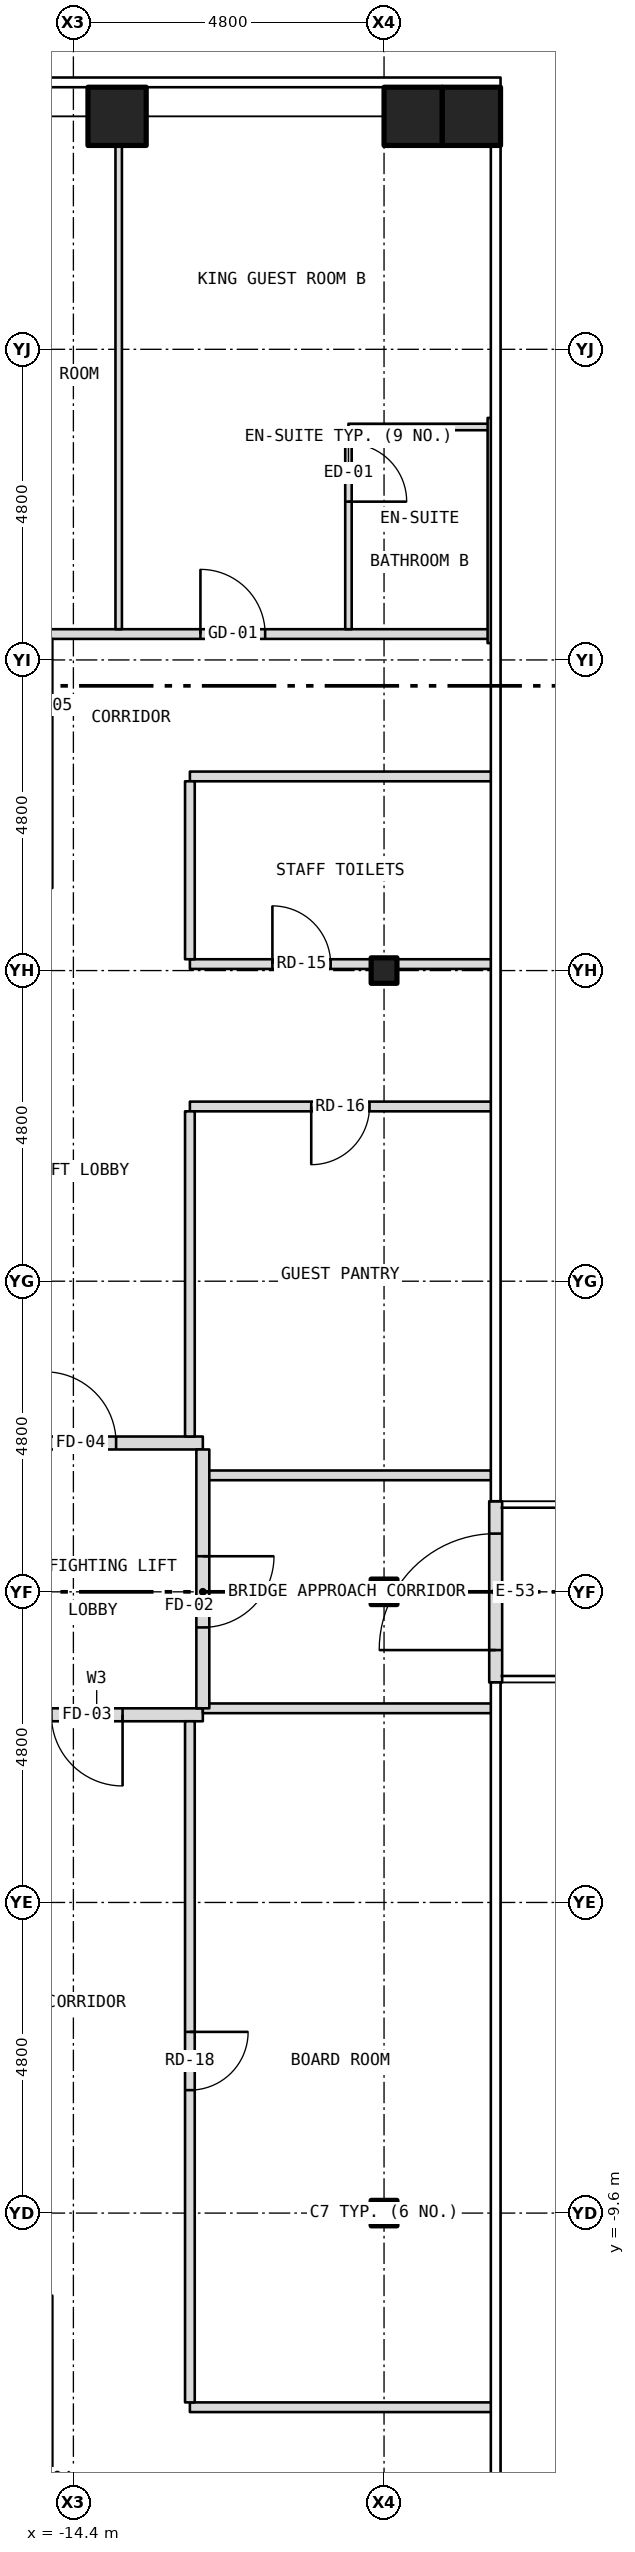
"""IFC4 building model, lengths in metres.
Left out: names, types, materials, properties, quantities, classifications, styles, units other than length and angle.
Written with IfcOpenShell. Run it as: python <this file> out.ifc"""

import sys

from ifc_helpers import new_model, si_unit, direction, frame, frame_2d, origin, origin_2d, place, context, subcontext, project, spatial, rectangle, hollow_rectangle, i_section, extrude, element, fill, save


model = new_model("IFC4")
c1 = context("Model", 3, precision=1e-05, world=origin(), true_north=direction((0.0, 1.0)))
c2 = subcontext(c1, "Body", "Model", "MODEL_VIEW")
j1 = project(units=[si_unit("LENGTHUNIT", "METRE"), si_unit("PLANEANGLEUNIT", "RADIAN")], contexts=[c1])
p1 = place(None, origin())
s1 = spatial("IfcSite", under=j1, at=p1, CompositionType="ELEMENT")
p2 = place(p1, origin())
s2 = spatial("IfcBuilding", under=s1, at=p2, CompositionType="ELEMENT")
p3 = place(p2, frame((0.0, 0.0, 131.0)))
s3 = spatial("IfcBuildingStorey", under=s2, at=p3, CompositionType="ELEMENT", Elevation=131.0)
for number, where, z_axis, x_axis in (
    (1, (-13.725, 22.8, -0.15), (0.0, 0.0, 1.0), (1.0, 0.0, 0.0)),
    (2, (-9.15, 22.8, -0.15), (0.0, 0.0, 1.0), (1.0, 0.0, 0.0)),
    (3, (-8.25, 22.8, -0.15), (0.0, 0.0, 1.0), (1.0, 0.0, 0.0)),
):
    element("IfcColumn", number, at=place(p3, frame(where, z_axis=z_axis, x_axis=x_axis)), inside=s3, PredefinedType="COLUMN", context=c2, shape_type="SweptSolid", body=[
        extrude(hollow_rectangle(XDim=0.9, YDim=0.9, WallThickness=0.05, at=origin_2d()), origin(), (0.0, 0.0, 1.0), 3.5),
    ])
for number, where, z_axis, x_axis in (
    (4, (-9.6, -9.6, -0.15), (0.0, 0.0, 1.0), (1.0, 0.0, 0.0)),
    (5, (-9.6, 0.0, -0.15), (0.0, 0.0, 1.0), (1.0, 0.0, 0.0)),
    (6, (-9.6, 9.6, -0.15), (0.0, 0.0, 1.0), (1.0, 0.0, 0.0)),
):
    element("IfcColumn", number, at=place(p3, frame(where, z_axis=z_axis, x_axis=x_axis)), inside=s3, PredefinedType="COLUMN", context=c2, shape_type="SweptSolid", body=[
        extrude(i_section(OverallWidth=0.399, OverallDepth=0.394, WebThickness=0.023, FlangeThickness=0.037, at=origin_2d()), origin(), (0.0, 0.0, 1.0), 3.5),
    ])
p4 = place(p3, frame((-7.875, -1.4, 0.0), z_axis=(0.0, 0.0, 1.0), x_axis=(0.0, 1.0, 0.0)))
e7 = element("IfcWall", 7, at=p4, inside=s3, PredefinedType="SOLIDWALL", context=c2, shape_type="SweptSolid", body=[
    extrude(rectangle(XDim=2.8, YDim=0.2, at=frame_2d((1.4, 0.0))), origin(), (0.0, 0.0, 1.0), 3.5),
])
p5 = place(p4, frame((0.5, 0.0, 0.0)))
e8 = element("IfcOpeningElement", 8, at=p5, cuts=e7, PredefinedType="OPENING", context=c2, shape_type="SweptSolid", body=[
    extrude(rectangle(XDim=1.8, YDim=2.1, at=frame_2d((0.9, 1.05))), frame((0.0, 0.112, 0.0), z_axis=(0.0, -1.0, 0.0), x_axis=(1.0, 0.0, 0.0)), (0.0, 0.0, 1.0), 0.224),
])
p6 = place(p3, frame((-12.6, -12.6, 0.0), z_axis=(0.0, 0.0, 1.0), x_axis=(1.0, 0.0, 0.0)))
e9 = element("IfcWall", 9, at=p6, inside=s3, PredefinedType="PARTITIONING", context=c2, shape_type="SweptSolid", body=[
    extrude(rectangle(XDim=4.68, YDim=0.15, at=frame_2d((2.34, 0.0))), origin(), (0.0, 0.0, 1.0), 3.35),
])
p7 = place(p3, frame((-15.68, -1.9, 0.0), z_axis=(0.0, 0.0, 1.0), x_axis=(1.0, 0.0, 0.0)))
e10 = element("IfcWall", 10, at=p7, inside=s3, PredefinedType="PARTITIONING", context=c2, shape_type="SweptSolid", body=[
    extrude(rectangle(XDim=3.28, YDim=0.2, at=frame_2d((1.64, 0.0))), origin(), (0.0, 0.0, 1.0), 3.35),
])
p8 = place(p7, frame((0.94, 0.0, 0.0)))
e11 = element("IfcOpeningElement", 11, at=p8, cuts=e10, PredefinedType="OPENING", context=c2, shape_type="SweptSolid", body=[
    extrude(rectangle(XDim=1.1, YDim=2.1, at=frame_2d((0.55, 1.05))), frame((0.0, 0.112, 0.0), z_axis=(0.0, -1.0, 0.0), x_axis=(1.0, 0.0, 0.0)), (0.0, 0.0, 1.0), 0.224),
])
for number, where, z_axis, x_axis in (
    (12, (-12.4, -1.8, 0.0), (0.0, 0.0, 1.0), (1.0, 0.0, 0.0)),
    (13, (-12.4, 1.8, 0.0), (0.0, 0.0, 1.0), (1.0, 0.0, 0.0)),
):
    element("IfcWall", number, at=place(p3, frame(where, z_axis=z_axis, x_axis=x_axis)), inside=s3, PredefinedType="PARTITIONING", context=c2, shape_type="SweptSolid", body=[
        extrude(rectangle(XDim=4.48, YDim=0.15, at=frame_2d((2.24, 0.0))), origin(), (0.0, 0.0, 1.0), 3.35),
    ])
p9 = place(p3, frame((-15.68, 2.3, 0.0), z_axis=(0.0, 0.0, 1.0), x_axis=(1.0, 0.0, 0.0)))
e14 = element("IfcWall", 14, at=p9, inside=s3, PredefinedType="PARTITIONING", context=c2, shape_type="SweptSolid", body=[
    extrude(rectangle(XDim=3.28, YDim=0.2, at=frame_2d((1.64, 0.0))), origin(), (0.0, 0.0, 1.0), 3.35),
])
p10 = place(p9, frame((0.84, 0.0, 0.0)))
e15 = element("IfcOpeningElement", 15, at=p10, cuts=e14, PredefinedType="OPENING", context=c2, shape_type="SweptSolid", body=[
    extrude(rectangle(XDim=1.1, YDim=2.1, at=frame_2d((0.55, 1.05))), frame((0.0, 0.112, 0.0), z_axis=(0.0, -1.0, 0.0), x_axis=(1.0, 0.0, 0.0)), (0.0, 0.0, 1.0), 0.224),
])
p11 = place(p3, frame((-12.6, 7.5, 0.0), z_axis=(0.0, 0.0, 1.0), x_axis=(1.0, 0.0, 0.0)))
e16 = element("IfcWall", 16, at=p11, inside=s3, PredefinedType="PARTITIONING", context=c2, shape_type="SweptSolid", body=[
    extrude(rectangle(XDim=4.68, YDim=0.15, at=frame_2d((2.34, 0.0))), origin(), (0.0, 0.0, 1.0), 3.35),
])
p12 = place(p11, frame((1.875, 0.0, 0.0)))
e17 = element("IfcOpeningElement", 17, at=p12, cuts=e16, PredefinedType="OPENING", context=c2, shape_type="SweptSolid", body=[
    extrude(rectangle(XDim=0.9, YDim=2.1, at=frame_2d((0.45, 1.05))), frame((0.0, 0.087, 0.0), z_axis=(0.0, -1.0, 0.0), x_axis=(1.0, 0.0, 0.0)), (0.0, 0.0, 1.0), 0.174),
])
p13 = place(p3, frame((-12.6, 9.7, 0.0), z_axis=(0.0, 0.0, 1.0), x_axis=(1.0, 0.0, 0.0)))
e18 = element("IfcWall", 18, at=p13, inside=s3, PredefinedType="PARTITIONING", context=c2, shape_type="SweptSolid", body=[
    extrude(rectangle(XDim=2.801, YDim=0.15, at=frame_2d((1.4, 0.0))), origin(), (0.0, 0.0, 1.0), 2.728),
])
p14 = place(p13, frame((1.275, 0.0, 0.0)))
e19 = element("IfcOpeningElement", 19, at=p14, cuts=e18, PredefinedType="OPENING", context=c2, shape_type="SweptSolid", body=[
    extrude(rectangle(XDim=0.9, YDim=2.1, at=frame_2d((0.45, 1.05))), frame((0.0, 0.087, 0.0), z_axis=(0.0, -1.0, 0.0), x_axis=(1.0, 0.0, 0.0)), (0.0, 0.0, 1.0), 0.174),
])
p15 = place(p3, frame((-9.799, 9.7, 0.0), z_axis=(0.0, 0.0, 1.0), x_axis=(1.0, 0.0, 0.0)))
e20 = element("IfcWall", 20, at=p15, inside=s3, PredefinedType="PARTITIONING", context=c2, shape_type="SweptSolid", body=[
    extrude(rectangle(XDim=0.398, YDim=0.15, at=frame_2d((0.199, 0.0))), origin(), (0.0, 0.0, 1.0), 3.35),
])
p16 = place(p3, frame((-9.401, 9.7, 0.0), z_axis=(0.0, 0.0, 1.0), x_axis=(1.0, 0.0, 0.0)))
e21 = element("IfcWall", 21, at=p16, inside=s3, PredefinedType="PARTITIONING", context=c2, shape_type="SweptSolid", body=[
    extrude(rectangle(XDim=1.481, YDim=0.15, at=frame_2d((0.74, 0.0))), origin(), (0.0, 0.0, 1.0), 2.728),
])
p17 = place(p3, frame((-12.6, 12.6, 0.0), z_axis=(0.0, 0.0, 1.0), x_axis=(1.0, 0.0, 0.0)))
e22 = element("IfcWall", 22, at=p17, inside=s3, PredefinedType="PARTITIONING", context=c2, shape_type="SweptSolid", body=[
    extrude(rectangle(XDim=4.68, YDim=0.15, at=frame_2d((2.34, 0.0))), origin(), (0.0, 0.0, 1.0), 3.35),
])
p18 = place(p3, frame((-14.8, 14.8, 0.0), z_axis=(0.0, 0.0, 1.0), x_axis=(1.0, 0.0, 0.0)))
e23 = element("IfcWall", 23, at=p18, inside=s3, PredefinedType="PARTITIONING", context=c2, shape_type="SweptSolid", body=[
    extrude(rectangle(XDim=6.85, YDim=0.15, at=frame_2d((3.425, 0.0))), origin(), (0.0, 0.0, 1.0), 3.35),
])
p19 = place(p18, frame((2.363, 0.0, 0.0)))
e24 = element("IfcOpeningElement", 24, at=p19, cuts=e23, PredefinedType="OPENING", context=c2, shape_type="SweptSolid", body=[
    extrude(rectangle(XDim=1.0, YDim=2.1, at=frame_2d((0.5, 1.05))), frame((0.0, 0.087, 0.0), z_axis=(0.0, -1.0, 0.0), x_axis=(1.0, 0.0, 0.0)), (0.0, 0.0, 1.0), 0.174),
])
p20 = place(p3, frame((-10.15, 18.0, 0.0), z_axis=(0.0, 0.0, 1.0), x_axis=(1.0, 0.0, 0.0)))
e25 = element("IfcWall", 25, at=p20, inside=s3, PredefinedType="PARTITIONING", context=c2, shape_type="SweptSolid", body=[
    extrude(rectangle(XDim=2.2, YDim=0.1, at=frame_2d((1.1, 0.0))), origin(), (0.0, 0.0, 1.0), 3.35),
])
p21 = place(p3, frame((-13.7, 14.875, 0.0), z_axis=(0.0, 0.0, 1.0), x_axis=(0.0, 1.0, 0.0)))
e26 = element("IfcWall", 26, at=p21, inside=s3, PredefinedType="PARTITIONING", context=c2, shape_type="SweptSolid", body=[
    extrude(rectangle(XDim=7.805, YDim=0.1, at=frame_2d((3.902, 0.0))), origin(), (0.0, 0.0, 1.0), 3.35),
])
p22 = place(p3, frame((-12.6, -12.525, 0.0), z_axis=(0.0, 0.0, 1.0), x_axis=(0.0, 1.0, 0.0)))
e27 = element("IfcWall", 27, at=p22, inside=s3, PredefinedType="PARTITIONING", context=c2, shape_type="SweptSolid", body=[
    extrude(rectangle(XDim=10.525, YDim=0.15, at=frame_2d((5.262, 0.0))), origin(), (0.0, 0.0, 1.0), 3.35),
])
p23 = place(p22, frame((4.825, 0.0, 0.0)))
e28 = element("IfcOpeningElement", 28, at=p23, cuts=e27, PredefinedType="OPENING", context=c2, shape_type="SweptSolid", body=[
    extrude(rectangle(XDim=0.9, YDim=2.1, at=frame_2d((0.45, 1.05))), frame((0.0, 0.087, 0.0), z_axis=(0.0, -1.0, 0.0), x_axis=(1.0, 0.0, 0.0)), (0.0, 0.0, 1.0), 0.174),
])
p24 = place(p3, frame((-12.6, 2.4, 0.0), z_axis=(0.0, 0.0, 1.0), x_axis=(0.0, 1.0, 0.0)))
e29 = element("IfcWall", 29, at=p24, inside=s3, PredefinedType="PARTITIONING", context=c2, shape_type="SweptSolid", body=[
    extrude(rectangle(XDim=5.025, YDim=0.15, at=frame_2d((2.513, 0.0))), origin(), (0.0, 0.0, 1.0), 3.35),
])
p25 = place(p3, frame((-12.6, 9.775, 0.0), z_axis=(0.0, 0.0, 1.0), x_axis=(0.0, 1.0, 0.0)))
e30 = element("IfcWall", 30, at=p25, inside=s3, PredefinedType="PARTITIONING", context=c2, shape_type="SweptSolid", body=[
    extrude(rectangle(XDim=2.75, YDim=0.15, at=frame_2d((1.375, 0.0))), origin(), (0.0, 0.0, 1.0), 3.35),
])
p26 = place(p3, frame((-12.4, -1.8, 0.0), z_axis=(0.0, 0.0, 1.0), x_axis=(0.0, 1.0, 0.0)))
e31 = element("IfcWall", 31, at=p26, inside=s3, PredefinedType="PARTITIONING", context=c2, shape_type="SweptSolid", body=[
    extrude(rectangle(XDim=4.0, YDim=0.2, at=frame_2d((2.0, 0.0))), origin(), (0.0, 0.0, 1.0), 3.35),
])
p27 = place(p26, frame((1.25, 0.0, 0.0)))
e32 = element("IfcOpeningElement", 32, at=p27, cuts=e31, PredefinedType="OPENING", context=c2, shape_type="SweptSolid", body=[
    extrude(rectangle(XDim=1.1, YDim=2.1, at=frame_2d((0.55, 1.05))), frame((0.0, 0.112, 0.0), z_axis=(0.0, -1.0, 0.0), x_axis=(1.0, 0.0, 0.0)), (0.0, 0.0, 1.0), 0.224),
])
p28 = place(p3, frame((-10.15, 14.875, 0.0), z_axis=(0.0, 0.0, 1.0), x_axis=(0.0, 1.0, 0.0)))
e33 = element("IfcWall", 33, at=p28, inside=s3, PredefinedType="PARTITIONING", context=c2, shape_type="SweptSolid", body=[
    extrude(rectangle(XDim=3.075, YDim=0.1, at=frame_2d((1.538, 0.0))), origin(), (0.0, 0.0, 1.0), 3.35),
])
p29 = place(p28, frame((1.971, 0.0, 0.0)))
e34 = element("IfcOpeningElement", 34, at=p29, cuts=e33, PredefinedType="OPENING", context=c2, shape_type="SweptSolid", body=[
    extrude(rectangle(XDim=0.9, YDim=2.1, at=frame_2d((0.45, 1.05))), frame((0.0, 0.062, 0.0), z_axis=(0.0, -1.0, 0.0), x_axis=(1.0, 0.0, 0.0)), (0.0, 0.0, 1.0), 0.124),
])
p30 = place(p3, frame((-7.95, 14.66, 0.0), z_axis=(0.0, 0.0, 1.0), x_axis=(0.0, 1.0, 0.0)))
e35 = element("IfcWall", 35, at=p30, inside=s3, PredefinedType="PARTITIONING", context=c2, shape_type="SweptSolid", body=[
    extrude(rectangle(XDim=3.48, YDim=0.1, at=frame_2d((1.74, 0.0))), origin(), (0.0, 0.0, 1.0), 2.733),
])
p31 = place(p5, origin())
e36 = element("IfcDoor", 36, at=p31, inside=s3, OperationType="DOUBLE_DOOR_DOUBLE_SWING", PredefinedType="DOOR", context=c2, shape_type="SweptSolid", body=[
    extrude(rectangle(XDim=1.8, YDim=2.1, at=frame_2d((0.9, 1.05))), frame((0.0, 0.025, 0.0), z_axis=(0.0, -1.0, 0.0), x_axis=(1.0, 0.0, 0.0)), (0.0, 0.0, 1.0), 0.05),
])
fill(e8, e36)
p32 = place(p27, origin())
e37 = element("IfcDoor", 37, at=p32, inside=s3, OperationType="SINGLE_SWING_RIGHT", PredefinedType="DOOR", context=c2, shape_type="SweptSolid", body=[
    extrude(rectangle(XDim=1.1, YDim=2.1, at=frame_2d((0.55, 1.05))), frame((0.0, 0.025, 0.0), z_axis=(0.0, -1.0, 0.0), x_axis=(1.0, 0.0, 0.0)), (0.0, 0.0, 1.0), 0.05),
])
fill(e32, e37)
p33 = place(p8, origin())
e38 = element("IfcDoor", 38, at=p33, inside=s3, OperationType="SINGLE_SWING_RIGHT", PredefinedType="DOOR", context=c2, shape_type="SweptSolid", body=[
    extrude(rectangle(XDim=1.1, YDim=2.1, at=frame_2d((0.55, 1.05))), frame((0.0, 0.025, 0.0), z_axis=(0.0, -1.0, 0.0), x_axis=(1.0, 0.0, 0.0)), (0.0, 0.0, 1.0), 0.05),
])
fill(e11, e38)
p34 = place(p10, origin())
e39 = element("IfcDoor", 39, at=p34, inside=s3, OperationType="SINGLE_SWING_LEFT", PredefinedType="DOOR", context=c2, shape_type="SweptSolid", body=[
    extrude(rectangle(XDim=1.1, YDim=2.1, at=frame_2d((0.55, 1.05))), frame((0.0, 0.025, 0.0), z_axis=(0.0, -1.0, 0.0), x_axis=(1.0, 0.0, 0.0)), (0.0, 0.0, 1.0), 0.05),
])
fill(e15, e39)
p35 = place(p19, origin())
e40 = element("IfcDoor", 40, at=p35, inside=s3, OperationType="SINGLE_SWING_LEFT", PredefinedType="DOOR", context=c2, shape_type="SweptSolid", body=[
    extrude(rectangle(XDim=1.0, YDim=2.1, at=frame_2d((0.5, 1.05))), frame((0.0, 0.025, 0.0), z_axis=(0.0, -1.0, 0.0), x_axis=(1.0, 0.0, 0.0)), (0.0, 0.0, 1.0), 0.05),
])
fill(e24, e40)
p36 = place(p29, origin())
e41 = element("IfcDoor", 41, at=p36, inside=s3, OperationType="SINGLE_SWING_LEFT", PredefinedType="DOOR", context=c2, shape_type="SweptSolid", body=[
    extrude(rectangle(XDim=0.9, YDim=2.1, at=frame_2d((0.45, 1.05))), frame((0.0, 0.025, 0.0), z_axis=(0.0, -1.0, 0.0), x_axis=(1.0, 0.0, 0.0)), (0.0, 0.0, 1.0), 0.05),
])
fill(e34, e41)
p37 = place(p14, origin())
e42 = element("IfcDoor", 42, at=p37, inside=s3, OperationType="SINGLE_SWING_LEFT", PredefinedType="DOOR", context=c2, shape_type="SweptSolid", body=[
    extrude(rectangle(XDim=0.9, YDim=2.1, at=frame_2d((0.45, 1.05))), frame((0.0, 0.025, 0.0), z_axis=(0.0, -1.0, 0.0), x_axis=(1.0, 0.0, 0.0)), (0.0, 0.0, 1.0), 0.05),
])
fill(e19, e42)
p38 = place(p12, origin())
e43 = element("IfcDoor", 43, at=p38, inside=s3, OperationType="SINGLE_SWING_LEFT", PredefinedType="DOOR", context=c2, shape_type="SweptSolid", body=[
    extrude(rectangle(XDim=0.9, YDim=2.1, at=frame_2d((0.45, 1.05))), frame((0.0, 0.025, 0.0), z_axis=(0.0, -1.0, 0.0), x_axis=(1.0, 0.0, 0.0)), (0.0, 0.0, 1.0), 0.05),
])
fill(e17, e43)
p39 = place(p23, origin())
e44 = element("IfcDoor", 44, at=p39, inside=s3, OperationType="SINGLE_SWING_RIGHT", PredefinedType="DOOR", context=c2, shape_type="SweptSolid", body=[
    extrude(rectangle(XDim=0.9, YDim=2.1, at=frame_2d((0.45, 1.05))), frame((0.0, 0.025, 0.0), z_axis=(0.0, -1.0, 0.0), x_axis=(1.0, 0.0, 0.0)), (0.0, 0.0, 1.0), 0.05),
])
fill(e28, e44)
save(model, sys.argv[1])
